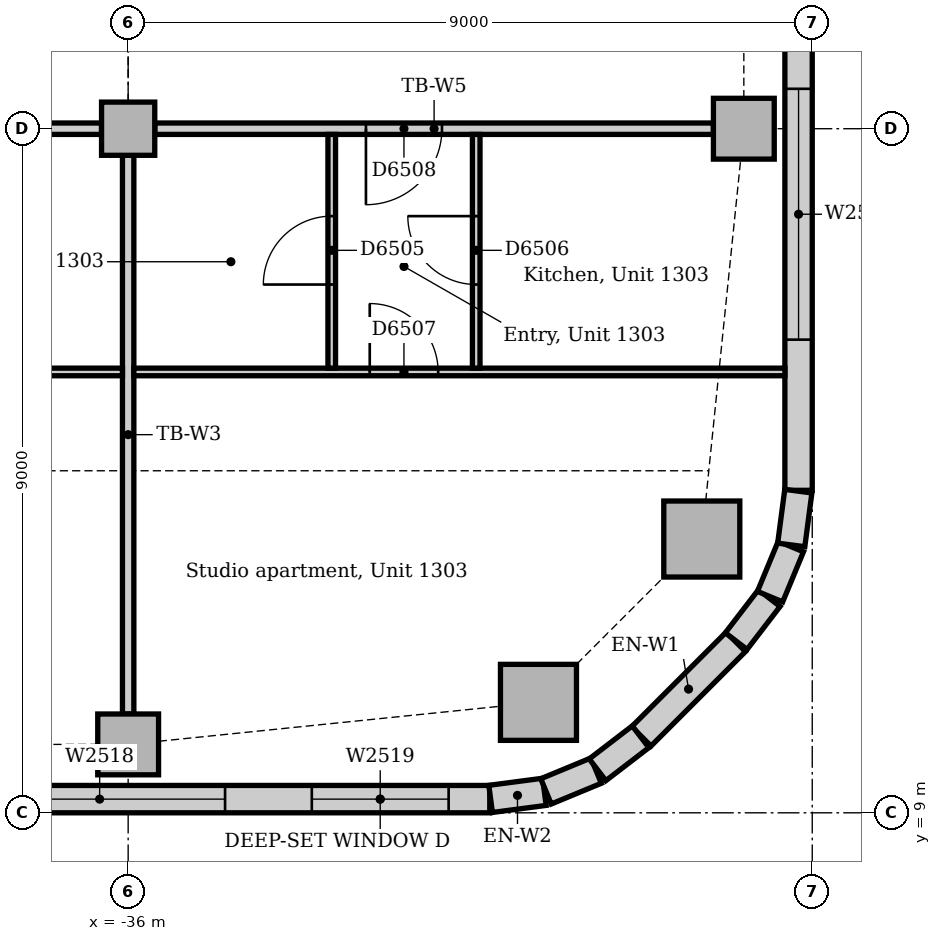
"""IFC4 building model, lengths in metres.
Left out: names, types, materials, properties, quantities, classifications, styles, units other than length and angle.
Written with IfcOpenShell. Run it as: python <this file> out.ifc"""

import sys

from ifc_helpers import new_model, si_unit, direction, frame, frame_2d, origin, origin_2d, place, context, subcontext, project, spatial, rectangle, extrude, element, fill, save


model = new_model("IFC4")
c1 = context("Model", 3, precision=1e-05, world=origin(), true_north=direction((0.0, 1.0)))
c2 = subcontext(c1, "Body", "Model", "MODEL_VIEW")
j1 = project(units=[si_unit("LENGTHUNIT", "METRE"), si_unit("PLANEANGLEUNIT", "RADIAN")], contexts=[c1])
p1 = place(None, origin())
s1 = spatial("IfcSite", under=j1, at=p1, CompositionType="ELEMENT")
p2 = place(p1, origin())
s2 = spatial("IfcBuilding", under=s1, at=p2, CompositionType="ELEMENT")
p3 = place(p2, frame((0.0, 0.0, 59.0)))
s3 = spatial("IfcBuildingStorey", under=s2, at=p3, CompositionType="ELEMENT", Elevation=59.0)
for number, where, z_axis, x_axis in (
    (1, (-30.602, 10.453, 0.0), (0.0, 0.0, 1.0), (1.0, 0.0, 0.0)),
    (2, (-28.453, 12.602, 0.0), (0.0, 0.0, 1.0), (1.0, 0.0, 0.0)),
):
    element("IfcColumn", number, at=place(p3, frame(where, z_axis=z_axis, x_axis=x_axis)), inside=s3, PredefinedType="COLUMN", context=c2, shape_type="SweptSolid", body=[
        extrude(rectangle(XDim=1.0, YDim=1.0, at=origin_2d()), origin(), (0.0, 0.0, 1.0), 3.85),
    ])
for number, where, z_axis, x_axis in (
    (3, (-36.0, 9.9, 0.0), (0.0, 0.0, 1.0), (1.0, 0.0, 0.0)),
    (4, (-27.9, 18.0, 0.0), (0.0, 0.0, 1.0), (1.0, 0.0, 0.0)),
):
    element("IfcColumn", number, at=place(p3, frame(where, z_axis=z_axis, x_axis=x_axis)), inside=s3, PredefinedType="COLUMN", context=c2, shape_type="SweptSolid", body=[
        extrude(rectangle(XDim=0.8, YDim=0.8, at=origin_2d()), origin(), (0.0, 0.0, 1.0), 3.85),
    ])
p4 = place(p3, frame((-36.0, 18.0, 0.0), z_axis=(0.0, 0.0, 1.0), x_axis=(1.0, 0.0, 0.0)))
e5 = element("IfcColumn", 5, at=p4, inside=s3, PredefinedType="COLUMN", context=c2, shape_type="SweptSolid", body=[
    extrude(rectangle(XDim=0.7, YDim=0.7, at=origin_2d()), origin(), (0.0, 0.0, 1.0), 3.85),
])
p5 = place(p3, frame((-55.007, 9.18, 0.0), z_axis=(0.0, 0.0, 1.0), x_axis=(1.0, 0.0, 0.0)))
e6 = element("IfcWall", 6, at=p5, inside=s3, PredefinedType="STANDARD", context=c2, shape_type="SweptSolid", body=[
    extrude(rectangle(XDim=23.765, YDim=0.36, at=frame_2d((11.882, 0.0))), origin(), (0.0, 0.0, 1.0), 3.85),
])
p6 = place(p5, frame((3.482, 0.0, 0.9)))
e7 = element("IfcOpeningElement", 7, at=p6, cuts=e6, PredefinedType="OPENING", context=c2, shape_type="SweptSolid", body=[
    extrude(rectangle(XDim=3.3, YDim=1.6, at=frame_2d((1.65, 0.8))), frame((0.0, 0.19, 0.0), z_axis=(0.0, -1.0, 0.0), x_axis=(1.0, 0.0, 0.0)), (0.0, 0.0, 1.0), 0.38),
])
p7 = place(p5, frame((7.982, 0.0, 0.9)))
e8 = element("IfcOpeningElement", 8, at=p7, cuts=e6, PredefinedType="OPENING", context=c2, shape_type="SweptSolid", body=[
    extrude(rectangle(XDim=3.3, YDim=1.6, at=frame_2d((1.65, 0.8))), frame((0.0, 0.19, 0.0), z_axis=(0.0, -1.0, 0.0), x_axis=(1.0, 0.0, 0.0)), (0.0, 0.0, 1.0), 0.38),
])
p8 = place(p5, frame((12.482, 0.0, 0.9)))
e9 = element("IfcOpeningElement", 9, at=p8, cuts=e6, PredefinedType="OPENING", context=c2, shape_type="SweptSolid", body=[
    extrude(rectangle(XDim=3.3, YDim=1.6, at=frame_2d((1.65, 0.8))), frame((0.0, 0.19, 0.0), z_axis=(0.0, -1.0, 0.0), x_axis=(1.0, 0.0, 0.0)), (0.0, 0.0, 1.0), 0.38),
])
p9 = place(p5, frame((16.982, 0.0, 0.9)))
e10 = element("IfcOpeningElement", 10, at=p9, cuts=e6, PredefinedType="OPENING", context=c2, shape_type="SweptSolid", body=[
    extrude(rectangle(XDim=3.3, YDim=1.6, at=frame_2d((1.65, 0.8))), frame((0.0, 0.19, 0.0), z_axis=(0.0, -1.0, 0.0), x_axis=(1.0, 0.0, 0.0)), (0.0, 0.0, 1.0), 0.38),
])
p10 = place(p5, frame((21.424, 0.0, 0.9)))
e11 = element("IfcOpeningElement", 11, at=p10, cuts=e6, PredefinedType="OPENING", context=c2, shape_type="SweptSolid", body=[
    extrude(rectangle(XDim=1.8, YDim=1.6, at=frame_2d((0.9, 0.8))), frame((0.0, 0.19, 0.0), z_axis=(0.0, -1.0, 0.0), x_axis=(1.0, 0.0, 0.0)), (0.0, 0.0, 1.0), 0.38),
])
p11 = place(p3, frame((-29.249, 10.006, 0.0), z_axis=(0.0, 0.0, 1.0), x_axis=(0.707106781187, 0.707106781187, 0.0)))
e12 = element("IfcWall", 12, at=p11, inside=s3, PredefinedType="STANDARD", context=c2, shape_type="SweptSolid", body=[
    extrude(rectangle(XDim=1.757, YDim=0.36, at=frame_2d((0.879, 0.0))), origin(), (0.0, 0.0, 1.0), 3.85),
])
p12 = place(p3, frame((-27.18, 13.243, 0.0), z_axis=(0.0, 0.0, 1.0), x_axis=(0.0, 1.0, 0.0)))
e13 = element("IfcWall", 13, at=p12, inside=s3, PredefinedType="STANDARD", context=c2, shape_type="SweptSolid", body=[
    extrude(rectangle(XDim=7.757, YDim=0.36, at=frame_2d((3.879, 0.0))), origin(), (0.0, 0.0, 1.0), 3.85),
])
p13 = place(p12, frame((1.982, 0.0, 0.9)))
e14 = element("IfcOpeningElement", 14, at=p13, cuts=e13, PredefinedType="OPENING", context=c2, shape_type="SweptSolid", body=[
    extrude(rectangle(XDim=3.3, YDim=1.6, at=frame_2d((1.65, 0.8))), frame((0.0, 0.19, 0.0), z_axis=(0.0, -1.0, 0.0), x_axis=(1.0, 0.0, 0.0)), (0.0, 0.0, 1.0), 0.38),
])
for number, where, z_axis, x_axis in (
    (15, (-31.231, 9.183, 0.0), (0.0, 0.0, 1.0), (0.991, 0.131, 0.0)),
    (16, (-30.503, 9.282, 0.0), (0.0, 0.0, 1.0), (0.924, 0.383, 0.0)),
):
    element("IfcWall", number, at=place(p3, frame(where, z_axis=z_axis, x_axis=x_axis)), inside=s3, PredefinedType="STANDARD", context=c2, shape_type="SweptSolid", body=[
        extrude(rectangle(XDim=0.713, YDim=0.36, at=frame_2d((0.356, 0.0))), origin(), (0.0, 0.0, 1.0), 3.85),
    ])
for number, where, z_axis, x_axis in (
    (17, (-29.825, 9.566, 0.0), (0.0, 0.0, 1.0), (0.793, 0.609, 0.0)),
    (18, (-28.0, 11.259, 0.0), (0.0, 0.0, 1.0), (0.609, 0.793, 0.0)),
):
    element("IfcWall", number, at=place(p3, frame(where, z_axis=z_axis, x_axis=x_axis)), inside=s3, PredefinedType="STANDARD", context=c2, shape_type="SweptSolid", body=[
        extrude(rectangle(XDim=0.713, YDim=0.36, at=frame_2d((0.357, 0.0))), origin(), (0.0, 0.0, 1.0), 3.85),
    ])
for number, where, z_axis, x_axis in (
    (19, (-27.555, 11.844, 0.0), (0.0, 0.0, 1.0), (0.383, 0.924, 0.0)),
    (20, (-27.276, 12.524, 0.0), (0.0, 0.0, 1.0), (0.131, 0.991, 0.0)),
):
    element("IfcWall", number, at=place(p3, frame(where, z_axis=z_axis, x_axis=x_axis)), inside=s3, PredefinedType="STANDARD", context=c2, shape_type="SweptSolid", body=[
        extrude(rectangle(XDim=0.713, YDim=0.36, at=frame_2d((0.356, 0.0))), origin(), (0.0, 0.0, 1.0), 3.85),
    ])
p14 = place(p3, frame((-35.65, 18.0, 0.0), z_axis=(0.0, 0.0, 1.0), x_axis=(1.0, 0.0, 0.0)))
e21 = element("IfcWall", 21, at=p14, inside=s3, PredefinedType="PARTITIONING", context=c2, shape_type="SweptSolid", body=[
    extrude(rectangle(XDim=7.35, YDim=0.15, at=frame_2d((3.675, 0.0))), origin(), (0.0, 0.0, 1.0), 3.158),
])
p15 = place(p14, frame((2.778, 0.0, 0.0)))
e22 = element("IfcOpeningElement", 22, at=p15, cuts=e21, PredefinedType="OPENING", context=c2, shape_type="SweptSolid", body=[
    extrude(rectangle(XDim=1.0, YDim=2.1, at=frame_2d((0.5, 1.05))), frame((0.0, 0.085, 0.0), z_axis=(0.0, -1.0, 0.0), x_axis=(1.0, 0.0, 0.0)), (0.0, 0.0, 1.0), 0.17),
])
p16 = place(p3, frame((-44.65, 18.0, 0.0), z_axis=(0.0, 0.0, 1.0), x_axis=(1.0, 0.0, 0.0)))
e23 = element("IfcWall", 23, at=p16, inside=s3, PredefinedType="PARTITIONING", context=c2, shape_type="SweptSolid", body=[
    extrude(rectangle(XDim=8.3, YDim=0.15, at=frame_2d((4.15, 0.0))), origin(), (0.0, 0.0, 1.0), 3.158),
])
p17 = place(p3, frame((-36.0, 10.3, 0.0), z_axis=(0.0, 0.0, 1.0), x_axis=(0.0, 1.0, 0.0)))
e24 = element("IfcWall", 24, at=p17, inside=s3, PredefinedType="PARTITIONING", context=c2, shape_type="SweptSolid", body=[
    extrude(rectangle(XDim=7.35, YDim=0.15, at=frame_2d((3.675, 0.0))), origin(), (0.0, 0.0, 1.0), 3.256),
])
p18 = place(p3, frame((-54.05, 14.8, 0.0), z_axis=(0.0, 0.0, 1.0), x_axis=(1.0, 0.0, 0.0)))
e25 = element("IfcWall", 25, at=p18, inside=s3, PredefinedType="PARTITIONING", context=c2, shape_type="SweptSolid", body=[
    extrude(rectangle(XDim=17.975, YDim=0.1, at=frame_2d((8.988, 0.0))), origin(), (0.0, 0.0, 1.0), 3.85),
])
p19 = place(p18, frame((7.18, 0.0, 0.0)))
e26 = element("IfcOpeningElement", 26, at=p19, cuts=e25, PredefinedType="OPENING", context=c2, shape_type="SweptSolid", body=[
    extrude(rectangle(XDim=0.9, YDim=2.1, at=frame_2d((0.45, 1.05))), frame((0.0, 0.06, 0.0), z_axis=(0.0, -1.0, 0.0), x_axis=(1.0, 0.0, 0.0)), (0.0, 0.0, 1.0), 0.12),
])
p20 = place(p3, frame((-35.925, 14.8, 0.0), z_axis=(0.0, 0.0, 1.0), x_axis=(1.0, 0.0, 0.0)))
e27 = element("IfcWall", 27, at=p20, inside=s3, PredefinedType="PARTITIONING", context=c2, shape_type="SweptSolid", body=[
    extrude(rectangle(XDim=8.565, YDim=0.1, at=frame_2d((4.282, 0.0))), origin(), (0.0, 0.0, 1.0), 3.85),
])
p21 = place(p20, frame((3.103, 0.0, 0.0)))
e28 = element("IfcOpeningElement", 28, at=p21, cuts=e27, PredefinedType="OPENING", context=c2, shape_type="SweptSolid", body=[
    extrude(rectangle(XDim=0.9, YDim=2.1, at=frame_2d((0.45, 1.05))), frame((0.0, 0.06, 0.0), z_axis=(0.0, -1.0, 0.0), x_axis=(1.0, 0.0, 0.0)), (0.0, 0.0, 1.0), 0.12),
])
p22 = place(p3, frame((-33.322, 14.85, 0.0), z_axis=(0.0, 0.0, 1.0), x_axis=(0.0, 1.0, 0.0)))
e29 = element("IfcWall", 29, at=p22, inside=s3, PredefinedType="PARTITIONING", context=c2, shape_type="SweptSolid", body=[
    extrude(rectangle(XDim=3.075, YDim=0.1, at=frame_2d((1.538, 0.0))), origin(), (0.0, 0.0, 1.0), 3.85),
])
p23 = place(p22, frame((1.1, 0.0, 0.0)))
e30 = element("IfcOpeningElement", 30, at=p23, cuts=e29, PredefinedType="OPENING", context=c2, shape_type="SweptSolid", body=[
    extrude(rectangle(XDim=0.9, YDim=2.1, at=frame_2d((0.45, 1.05))), frame((0.0, 0.06, 0.0), z_axis=(0.0, -1.0, 0.0), x_axis=(1.0, 0.0, 0.0)), (0.0, 0.0, 1.0), 0.12),
])
p24 = place(p3, frame((-31.421, 14.85, 0.0), z_axis=(0.0, 0.0, 1.0), x_axis=(0.0, 1.0, 0.0)))
e31 = element("IfcWall", 31, at=p24, inside=s3, PredefinedType="PARTITIONING", context=c2, shape_type="SweptSolid", body=[
    extrude(rectangle(XDim=3.075, YDim=0.1, at=frame_2d((1.538, 0.0))), origin(), (0.0, 0.0, 1.0), 3.85),
])
p25 = place(p24, frame((1.1, 0.0, 0.0)))
e32 = element("IfcOpeningElement", 32, at=p25, cuts=e31, PredefinedType="OPENING", context=c2, shape_type="SweptSolid", body=[
    extrude(rectangle(XDim=0.9, YDim=2.1, at=frame_2d((0.45, 1.05))), frame((0.0, 0.06, 0.0), z_axis=(0.0, -1.0, 0.0), x_axis=(1.0, 0.0, 0.0)), (0.0, 0.0, 1.0), 0.12),
])
p26 = place(p9, origin())
e33 = element("IfcWindow", 33, at=p26, inside=s3, PartitioningType="SINGLE_PANEL", PredefinedType="WINDOW", context=c2, shape_type="SweptSolid", body=[
    extrude(rectangle(XDim=3.3, YDim=1.6, at=frame_2d((1.65, 0.8))), frame((0.0, 0.13, 0.0), z_axis=(0.0, -1.0, 0.0), x_axis=(1.0, 0.0, 0.0)), (0.0, 0.0, 1.0), 0.06),
])
fill(e10, e33)
p27 = place(p10, origin())
e34 = element("IfcWindow", 34, at=p27, inside=s3, PartitioningType="SINGLE_PANEL", PredefinedType="WINDOW", context=c2, shape_type="SweptSolid", body=[
    extrude(rectangle(XDim=1.8, YDim=1.6, at=frame_2d((0.9, 0.8))), frame((0.0, 0.13, 0.0), z_axis=(0.0, -1.0, 0.0), x_axis=(1.0, 0.0, 0.0)), (0.0, 0.0, 1.0), 0.06),
])
fill(e11, e34)
p28 = place(p13, origin())
e35 = element("IfcWindow", 35, at=p28, inside=s3, PartitioningType="SINGLE_PANEL", PredefinedType="WINDOW", context=c2, shape_type="SweptSolid", body=[
    extrude(rectangle(XDim=3.3, YDim=1.6, at=frame_2d((1.65, 0.8))), frame((0.0, 0.13, 0.0), z_axis=(0.0, -1.0, 0.0), x_axis=(1.0, 0.0, 0.0)), (0.0, 0.0, 1.0), 0.06),
])
fill(e14, e35)
p29 = place(p23, origin())
e36 = element("IfcDoor", 36, at=p29, inside=s3, OperationType="SINGLE_SWING_LEFT", PredefinedType="DOOR", context=c2, shape_type="SweptSolid", body=[
    extrude(rectangle(XDim=0.9, YDim=2.1, at=frame_2d((0.45, 1.05))), frame((0.0, 0.025, 0.0), z_axis=(0.0, -1.0, 0.0), x_axis=(1.0, 0.0, 0.0)), (0.0, 0.0, 1.0), 0.05),
])
fill(e30, e36)
p30 = place(p25, origin())
e37 = element("IfcDoor", 37, at=p30, inside=s3, OperationType="SINGLE_SWING_RIGHT", PredefinedType="DOOR", context=c2, shape_type="SweptSolid", body=[
    extrude(rectangle(XDim=0.9, YDim=2.1, at=frame_2d((0.45, 1.05))), frame((0.0, 0.025, 0.0), z_axis=(0.0, -1.0, 0.0), x_axis=(1.0, 0.0, 0.0)), (0.0, 0.0, 1.0), 0.05),
])
fill(e32, e37)
p31 = place(p21, origin())
e38 = element("IfcDoor", 38, at=p31, inside=s3, OperationType="SINGLE_SWING_LEFT", PredefinedType="DOOR", context=c2, shape_type="SweptSolid", body=[
    extrude(rectangle(XDim=0.9, YDim=2.1, at=frame_2d((0.45, 1.05))), frame((0.0, 0.025, 0.0), z_axis=(0.0, -1.0, 0.0), x_axis=(1.0, 0.0, 0.0)), (0.0, 0.0, 1.0), 0.05),
])
fill(e28, e38)
p32 = place(p15, frame((1.0, 0.0, 0.0), z_axis=(0.0, 0.0, 1.0), x_axis=(-1.0, 0.0, 0.0)))
e39 = element("IfcDoor", 39, at=p32, inside=s3, OperationType="SINGLE_SWING_RIGHT", PredefinedType="DOOR", context=c2, shape_type="SweptSolid", body=[
    extrude(rectangle(XDim=1.0, YDim=2.1, at=frame_2d((0.5, 1.05))), frame((0.0, 0.025, 0.0), z_axis=(0.0, -1.0, 0.0), x_axis=(1.0, 0.0, 0.0)), (0.0, 0.0, 1.0), 0.05),
])
fill(e22, e39)
save(model, sys.argv[1])
